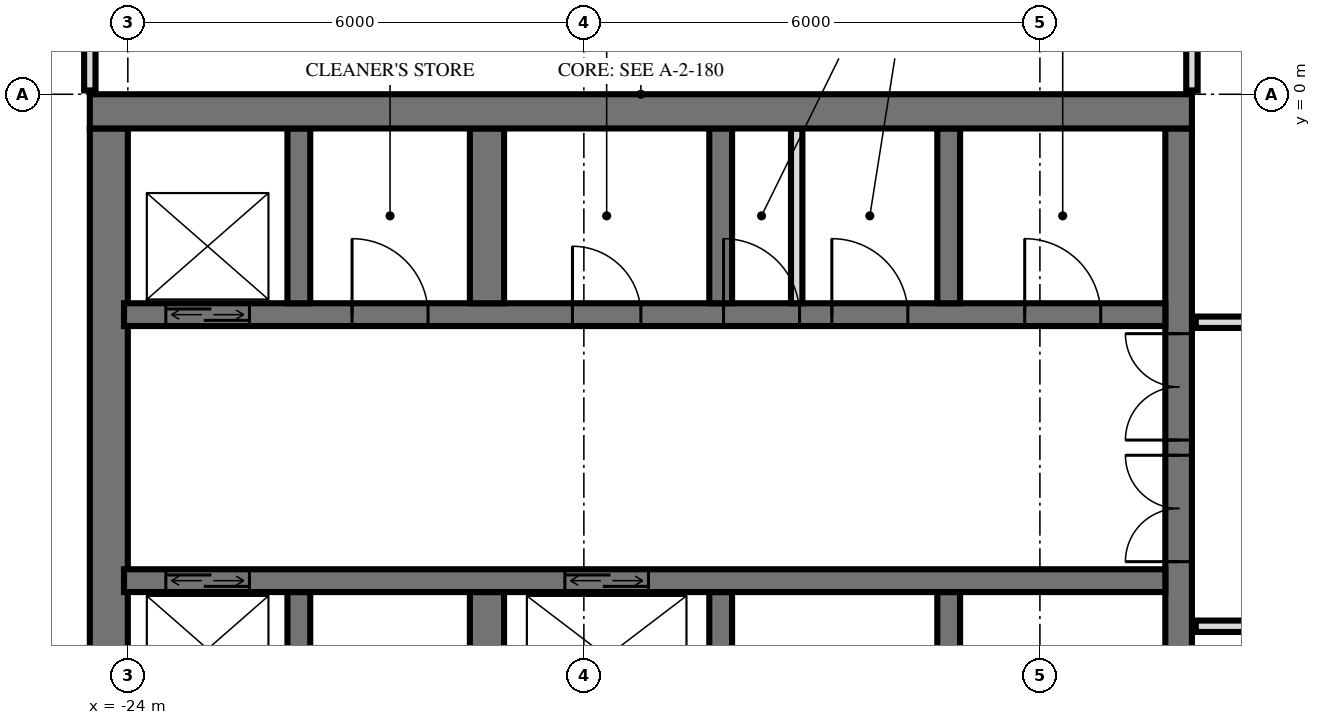
"""IFC4 building model, lengths in metres.
Left out: names, types, materials, properties, quantities, classifications, styles, units other than length and angle.
Written with IfcOpenShell. Run it as: python <this file> out.ifc"""

import sys

from ifc_helpers import new_model, si_unit, direction, frame, frame_2d, origin, place, context, subcontext, project, spatial, rectangle, extrude, element, fill, save


model = new_model("IFC4")
c1 = context("Model", 3, precision=1e-05, world=origin(), true_north=direction((0.0, 1.0)))
c2 = subcontext(c1, "Body", "Model", "MODEL_VIEW")
j1 = project(units=[si_unit("LENGTHUNIT", "METRE"), si_unit("PLANEANGLEUNIT", "RADIAN")], contexts=[c1])
p1 = place(None, origin())
s1 = spatial("IfcSite", under=j1, at=p1, CompositionType="ELEMENT")
p2 = place(p1, origin())
s2 = spatial("IfcBuilding", under=s1, at=p2, CompositionType="ELEMENT")
p3 = place(p2, frame((0.0, 0.0, 174.0)))
s3 = spatial("IfcBuildingStorey", under=s2, at=p3, CompositionType="ELEMENT", Elevation=174.0)
p4 = place(p3, frame((-24.5, -0.225, 0.0), z_axis=(0.0, 0.0, 1.0), x_axis=(1.0, 0.0, 0.0)))
e1 = element("IfcWall", 1, at=p4, inside=s3, PredefinedType="SHEAR", context=c2, shape_type="SweptSolid", body=[
    extrude(rectangle(XDim=14.5, YDim=0.45, at=frame_2d((7.25, 0.0))), origin(), (0.0, 0.0, 1.0), 3.6),
])
p5 = place(p3, frame((-10.175, -14.55, 0.0), z_axis=(0.0, 0.0, 1.0), x_axis=(0.0, 1.0, 0.0)))
e2 = element("IfcWall", 2, at=p5, inside=s3, PredefinedType="SHEAR", context=c2, shape_type="SweptSolid", body=[
    extrude(rectangle(XDim=14.1, YDim=0.35, at=frame_2d((7.05, 0.0))), origin(), (0.0, 0.0, 1.0), 3.6),
])
p6 = place(p5, frame((8.4, 0.0, 0.0)))
e3 = element("IfcOpeningElement", 3, at=p6, cuts=e2, PredefinedType="OPENING", context=c2, shape_type="SweptSolid", body=[
    extrude(rectangle(XDim=1.4, YDim=2.4, at=frame_2d((0.7, 1.2))), frame((0.0, 0.185, 0.0), z_axis=(0.0, -1.0, 0.0), x_axis=(1.0, 0.0, 0.0)), (0.0, 0.0, 1.0), 0.37),
])
p7 = place(p5, frame((10.0, 0.0, 0.0)))
e4 = element("IfcOpeningElement", 4, at=p7, cuts=e2, PredefinedType="OPENING", context=c2, shape_type="SweptSolid", body=[
    extrude(rectangle(XDim=1.4, YDim=2.4, at=frame_2d((0.7, 1.2))), frame((0.0, 0.185, 0.0), z_axis=(0.0, -1.0, 0.0), x_axis=(1.0, 0.0, 0.0)), (0.0, 0.0, 1.0), 0.37),
])
p8 = place(p5, frame((4.0, 0.0, 0.0)))
e5 = element("IfcOpeningElement", 5, at=p8, cuts=e2, PredefinedType="OPENING", context=c2, shape_type="SweptSolid", body=[
    extrude(rectangle(XDim=1.2, YDim=2.1, at=frame_2d((0.6, 1.05))), frame((0.0, 0.185, 0.0), z_axis=(0.0, -1.0, 0.0), x_axis=(1.0, 0.0, 0.0)), (0.0, 0.0, 1.0), 0.37),
])
p9 = place(p3, frame((-24.25, -14.55, 0.0), z_axis=(0.0, 0.0, 1.0), x_axis=(0.0, 1.0, 0.0)))
e6 = element("IfcWall", 6, at=p9, inside=s3, PredefinedType="SHEAR", context=c2, shape_type="SweptSolid", body=[
    extrude(rectangle(XDim=14.1, YDim=0.5, at=frame_2d((7.05, 0.0))), origin(), (0.0, 0.0, 1.0), 3.6),
])
p10 = place(p3, frame((-24.05, -2.9, 0.0), z_axis=(0.0, 0.0, 1.0), x_axis=(1.0, 0.0, 0.0)))
e7 = element("IfcWall", 7, at=p10, inside=s3, PredefinedType="SHEAR", context=c2, shape_type="SweptSolid", body=[
    extrude(rectangle(XDim=13.7, YDim=0.3, at=frame_2d((6.85, 0.0))), origin(), (0.0, 0.0, 1.0), 3.6),
])
p11 = place(p10, frame((0.55, 0.0, 0.0)))
e8 = element("IfcOpeningElement", 8, at=p11, cuts=e7, PredefinedType="OPENING", context=c2, shape_type="SweptSolid", body=[
    extrude(rectangle(XDim=1.1, YDim=2.1, at=frame_2d((0.55, 1.05))), frame((0.0, 0.16, 0.0), z_axis=(0.0, -1.0, 0.0), x_axis=(1.0, 0.0, 0.0)), (0.0, 0.0, 1.0), 0.32),
])
p12 = place(p10, frame((5.9, 0.0, 0.0)))
e9 = element("IfcOpeningElement", 9, at=p12, cuts=e7, PredefinedType="OPENING", context=c2, shape_type="SweptSolid", body=[
    extrude(rectangle(XDim=0.9, YDim=2.1, at=frame_2d((0.45, 1.05))), frame((0.0, 0.16, 0.0), z_axis=(0.0, -1.0, 0.0), x_axis=(1.0, 0.0, 0.0)), (0.0, 0.0, 1.0), 0.32),
])
p13 = place(p10, frame((11.85, 0.0, 0.0)))
e10 = element("IfcOpeningElement", 10, at=p13, cuts=e7, PredefinedType="OPENING", context=c2, shape_type="SweptSolid", body=[
    extrude(rectangle(XDim=1.0, YDim=2.1, at=frame_2d((0.5, 1.05))), frame((0.0, 0.16, 0.0), z_axis=(0.0, -1.0, 0.0), x_axis=(1.0, 0.0, 0.0)), (0.0, 0.0, 1.0), 0.32),
])
p14 = place(p10, frame((9.312, 0.0, 0.0)))
e11 = element("IfcOpeningElement", 11, at=p14, cuts=e7, PredefinedType="OPENING", context=c2, shape_type="SweptSolid", body=[
    extrude(rectangle(XDim=1.0, YDim=2.1, at=frame_2d((0.5, 1.05))), frame((0.0, 0.16, 0.0), z_axis=(0.0, -1.0, 0.0), x_axis=(1.0, 0.0, 0.0)), (0.0, 0.0, 1.0), 0.32),
])
p15 = place(p10, frame((7.887, 0.0, 0.0)))
e12 = element("IfcOpeningElement", 12, at=p15, cuts=e7, PredefinedType="OPENING", context=c2, shape_type="SweptSolid", body=[
    extrude(rectangle(XDim=1.0, YDim=2.1, at=frame_2d((0.5, 1.05))), frame((0.0, 0.16, 0.0), z_axis=(0.0, -1.0, 0.0), x_axis=(1.0, 0.0, 0.0)), (0.0, 0.0, 1.0), 0.32),
])
p16 = place(p10, frame((3.0, 0.0, 0.0)))
e13 = element("IfcOpeningElement", 13, at=p16, cuts=e7, PredefinedType="OPENING", context=c2, shape_type="SweptSolid", body=[
    extrude(rectangle(XDim=1.0, YDim=2.1, at=frame_2d((0.5, 1.05))), frame((0.0, 0.16, 0.0), z_axis=(0.0, -1.0, 0.0), x_axis=(1.0, 0.0, 0.0)), (0.0, 0.0, 1.0), 0.32),
])
p17 = place(p3, frame((-24.05, -6.4, 0.0), z_axis=(0.0, 0.0, 1.0), x_axis=(1.0, 0.0, 0.0)))
e14 = element("IfcWall", 14, at=p17, inside=s3, PredefinedType="SHEAR", context=c2, shape_type="SweptSolid", body=[
    extrude(rectangle(XDim=13.7, YDim=0.3, at=frame_2d((6.85, 0.0))), origin(), (0.0, 0.0, 1.0), 3.6),
])
p18 = place(p17, frame((0.55, 0.0, 0.0)))
e15 = element("IfcOpeningElement", 15, at=p18, cuts=e14, PredefinedType="OPENING", context=c2, shape_type="SweptSolid", body=[
    extrude(rectangle(XDim=1.1, YDim=2.1, at=frame_2d((0.55, 1.05))), frame((0.0, 0.16, 0.0), z_axis=(0.0, -1.0, 0.0), x_axis=(1.0, 0.0, 0.0)), (0.0, 0.0, 1.0), 0.32),
])
p19 = place(p17, frame((5.8, 0.0, 0.0)))
e16 = element("IfcOpeningElement", 16, at=p19, cuts=e14, PredefinedType="OPENING", context=c2, shape_type="SweptSolid", body=[
    extrude(rectangle(XDim=1.1, YDim=2.1, at=frame_2d((0.55, 1.05))), frame((0.0, 0.16, 0.0), z_axis=(0.0, -1.0, 0.0), x_axis=(1.0, 0.0, 0.0)), (0.0, 0.0, 1.0), 0.32),
])
for number, where, z_axis, x_axis in (
    (17, (-13.2, -2.75, 0.0), (0.0, 0.0, 1.0), (0.0, 1.0, 0.0)),
    (18, (-13.2, -8.85, 0.0), (0.0, 0.0, 1.0), (0.0, 1.0, 0.0)),
    (19, (-16.2, -2.75, 0.0), (0.0, 0.0, 1.0), (0.0, 1.0, 0.0)),
    (20, (-16.2, -8.85, 0.0), (0.0, 0.0, 1.0), (0.0, 1.0, 0.0)),
):
    element("IfcWall", number, at=place(p3, frame(where, z_axis=z_axis, x_axis=x_axis)), inside=s3, PredefinedType="SHEAR", context=c2, shape_type="SweptSolid", body=[
        extrude(rectangle(XDim=2.3, YDim=0.3, at=frame_2d((1.15, 0.0))), origin(), (0.0, 0.0, 1.0), 3.6),
    ])
for number, where, z_axis, x_axis in (
    (21, (-19.275, -2.75, 0.0), (0.0, 0.0, 1.0), (0.0, 1.0, 0.0)),
    (22, (-19.275, -8.85, 0.0), (0.0, 0.0, 1.0), (0.0, 1.0, 0.0)),
):
    element("IfcWall", number, at=place(p3, frame(where, z_axis=z_axis, x_axis=x_axis)), inside=s3, PredefinedType="SHEAR", context=c2, shape_type="SweptSolid", body=[
        extrude(rectangle(XDim=2.3, YDim=0.45, at=frame_2d((1.15, 0.0))), origin(), (0.0, 0.0, 1.0), 3.6),
    ])
for number, where, z_axis, x_axis in (
    (23, (-21.75, -2.75, 0.0), (0.0, 0.0, 1.0), (0.0, 1.0, 0.0)),
    (24, (-21.75, -8.85, 0.0), (0.0, 0.0, 1.0), (0.0, 1.0, 0.0)),
):
    element("IfcWall", number, at=place(p3, frame(where, z_axis=z_axis, x_axis=x_axis)), inside=s3, PredefinedType="SHEAR", context=c2, shape_type="SweptSolid", body=[
        extrude(rectangle(XDim=2.3, YDim=0.3, at=frame_2d((1.15, 0.0))), origin(), (0.0, 0.0, 1.0), 3.6),
    ])
p20 = place(p3, frame((-15.2, -2.75, 0.0), z_axis=(0.0, 0.0, 1.0), x_axis=(0.0, 1.0, 0.0)))
e25 = element("IfcWall", 25, at=p20, inside=s3, PredefinedType="PARTITIONING", context=c2, shape_type="SweptSolid", body=[
    extrude(rectangle(XDim=2.3, YDim=0.15, at=frame_2d((1.15, 0.0))), origin(), (0.0, 0.0, 1.0), 3.3),
])
p21 = place(p3, frame((-10.0, 0.05, 0.0), z_axis=(0.0, 0.0, 1.0), x_axis=(0.0, 1.0, 0.0)))
e26 = element("IfcWall", 26, at=p21, inside=s3, PredefinedType="PARTITIONING", context=c2, shape_type="SweptSolid", body=[
    extrude(rectangle(XDim=0.97, YDim=0.15, at=frame_2d((0.485, 0.0))), origin(), (0.0, 0.0, 1.0), 3.32),
])
p22 = place(p3, frame((-24.5, 0.05, 0.0), z_axis=(0.0, 0.0, 1.0), x_axis=(0.0, 1.0, 0.0)))
e27 = element("IfcWall", 27, at=p22, inside=s3, PredefinedType="PARTITIONING", context=c2, shape_type="SweptSolid", body=[
    extrude(rectangle(XDim=0.807, YDim=0.15, at=frame_2d((0.404, 0.0))), origin(), (0.0, 0.0, 1.0), 3.32),
])
p23 = place(p3, frame((-9.95, -7.0, 0.0), z_axis=(0.0, 0.0, 1.0), x_axis=(1.0, 0.0, 0.0)))
e28 = element("IfcWall", 28, at=p23, inside=s3, PredefinedType="PARTITIONING", context=c2, shape_type="SweptSolid", body=[
    extrude(rectangle(XDim=19.9, YDim=0.15, at=frame_2d((9.95, 0.0))), origin(), (0.0, 0.0, 1.0), 3.32),
])
p24 = place(p23, frame((9.45, 0.0, 0.0)))
e29 = element("IfcOpeningElement", 29, at=p24, cuts=e28, PredefinedType="OPENING", context=c2, shape_type="SweptSolid", body=[
    extrude(rectangle(XDim=1.0, YDim=2.1, at=frame_2d((0.5, 1.05))), frame((0.0, 0.085, 0.0), z_axis=(0.0, -1.0, 0.0), x_axis=(1.0, 0.0, 0.0)), (0.0, 0.0, 1.0), 0.17),
])
p25 = place(p23, frame((15.45, 0.0, 0.0)))
e30 = element("IfcOpeningElement", 30, at=p25, cuts=e28, PredefinedType="OPENING", context=c2, shape_type="SweptSolid", body=[
    extrude(rectangle(XDim=1.0, YDim=2.1, at=frame_2d((0.5, 1.05))), frame((0.0, 0.085, 0.0), z_axis=(0.0, -1.0, 0.0), x_axis=(1.0, 0.0, 0.0)), (0.0, 0.0, 1.0), 0.17),
])
p26 = place(p3, frame((-9.95, -3.0, 0.0), z_axis=(0.0, 0.0, 1.0), x_axis=(1.0, 0.0, 0.0)))
e31 = element("IfcWall", 31, at=p26, inside=s3, PredefinedType="PARTITIONING", context=c2, shape_type="SweptSolid", body=[
    extrude(rectangle(XDim=19.9, YDim=0.15, at=frame_2d((9.95, 0.0))), origin(), (0.0, 0.0, 1.0), 3.32),
])
p27 = place(p26, frame((2.2, 0.0, 0.0)))
e32 = element("IfcOpeningElement", 32, at=p27, cuts=e31, PredefinedType="OPENING", context=c2, shape_type="SweptSolid", body=[
    extrude(rectangle(XDim=1.0, YDim=2.1, at=frame_2d((0.5, 1.05))), frame((0.0, 0.085, 0.0), z_axis=(0.0, -1.0, 0.0), x_axis=(1.0, 0.0, 0.0)), (0.0, 0.0, 1.0), 0.17),
])
p28 = place(p26, frame((7.2, 0.0, 0.0)))
e33 = element("IfcOpeningElement", 33, at=p28, cuts=e31, PredefinedType="OPENING", context=c2, shape_type="SweptSolid", body=[
    extrude(rectangle(XDim=1.0, YDim=2.1, at=frame_2d((0.5, 1.05))), frame((0.0, 0.085, 0.0), z_axis=(0.0, -1.0, 0.0), x_axis=(1.0, 0.0, 0.0)), (0.0, 0.0, 1.0), 0.17),
])
p29 = place(p26, frame((11.7, 0.0, 0.0)))
e34 = element("IfcOpeningElement", 34, at=p29, cuts=e31, PredefinedType="OPENING", context=c2, shape_type="SweptSolid", body=[
    extrude(rectangle(XDim=1.0, YDim=2.1, at=frame_2d((0.5, 1.05))), frame((0.0, 0.085, 0.0), z_axis=(0.0, -1.0, 0.0), x_axis=(1.0, 0.0, 0.0)), (0.0, 0.0, 1.0), 0.17),
])
p30 = place(p26, frame((15.45, 0.0, 0.0)))
e35 = element("IfcOpeningElement", 35, at=p30, cuts=e31, PredefinedType="OPENING", context=c2, shape_type="SweptSolid", body=[
    extrude(rectangle(XDim=1.0, YDim=2.1, at=frame_2d((0.5, 1.05))), frame((0.0, 0.085, 0.0), z_axis=(0.0, -1.0, 0.0), x_axis=(1.0, 0.0, 0.0)), (0.0, 0.0, 1.0), 0.17),
])
p31 = place(p26, frame((18.2, 0.0, 0.0)))
e36 = element("IfcOpeningElement", 36, at=p31, cuts=e31, PredefinedType="OPENING", context=c2, shape_type="SweptSolid", body=[
    extrude(rectangle(XDim=1.0, YDim=2.1, at=frame_2d((0.5, 1.05))), frame((0.0, 0.085, 0.0), z_axis=(0.0, -1.0, 0.0), x_axis=(1.0, 0.0, 0.0)), (0.0, 0.0, 1.0), 0.17),
])
p32 = place(p11, origin())
e37 = element("IfcDoor", 37, at=p32, inside=s3, OperationType="DOUBLE_DOOR_SLIDING", PredefinedType="USERDEFINED", context=c2, shape_type="SweptSolid", body=[
    extrude(rectangle(XDim=1.1, YDim=2.1, at=frame_2d((0.55, 1.05))), frame((0.0, 0.025, 0.0), z_axis=(0.0, -1.0, 0.0), x_axis=(1.0, 0.0, 0.0)), (0.0, 0.0, 1.0), 0.05),
])
fill(e8, e37)
p33 = place(p18, origin())
e38 = element("IfcDoor", 38, at=p33, inside=s3, OperationType="DOUBLE_DOOR_SLIDING", PredefinedType="USERDEFINED", context=c2, shape_type="SweptSolid", body=[
    extrude(rectangle(XDim=1.1, YDim=2.1, at=frame_2d((0.55, 1.05))), frame((0.0, 0.025, 0.0), z_axis=(0.0, -1.0, 0.0), x_axis=(1.0, 0.0, 0.0)), (0.0, 0.0, 1.0), 0.05),
])
fill(e15, e38)
p34 = place(p19, origin())
e39 = element("IfcDoor", 39, at=p34, inside=s3, OperationType="DOUBLE_DOOR_SLIDING", PredefinedType="USERDEFINED", context=c2, shape_type="SweptSolid", body=[
    extrude(rectangle(XDim=1.1, YDim=2.1, at=frame_2d((0.55, 1.05))), frame((0.0, 0.025, 0.0), z_axis=(0.0, -1.0, 0.0), x_axis=(1.0, 0.0, 0.0)), (0.0, 0.0, 1.0), 0.05),
])
fill(e16, e39)
p35 = place(p6, origin())
e40 = element("IfcDoor", 40, at=p35, inside=s3, OperationType="DOUBLE_DOOR_SINGLE_SWING", PredefinedType="DOOR", context=c2, shape_type="SweptSolid", body=[
    extrude(rectangle(XDim=1.4, YDim=2.4, at=frame_2d((0.7, 1.2))), frame((0.0, 0.025, 0.0), z_axis=(0.0, -1.0, 0.0), x_axis=(1.0, 0.0, 0.0)), (0.0, 0.0, 1.0), 0.05),
])
fill(e3, e40)
p36 = place(p7, origin())
e41 = element("IfcDoor", 41, at=p36, inside=s3, OperationType="DOUBLE_DOOR_SINGLE_SWING", PredefinedType="DOOR", context=c2, shape_type="SweptSolid", body=[
    extrude(rectangle(XDim=1.4, YDim=2.4, at=frame_2d((0.7, 1.2))), frame((0.0, 0.025, 0.0), z_axis=(0.0, -1.0, 0.0), x_axis=(1.0, 0.0, 0.0)), (0.0, 0.0, 1.0), 0.05),
])
fill(e4, e41)
p37 = place(p12, origin())
e42 = element("IfcDoor", 42, at=p37, inside=s3, OperationType="SINGLE_SWING_RIGHT", PredefinedType="DOOR", context=c2, shape_type="SweptSolid", body=[
    extrude(rectangle(XDim=0.9, YDim=2.1, at=frame_2d((0.45, 1.05))), frame((0.0, 0.025, 0.0), z_axis=(0.0, -1.0, 0.0), x_axis=(1.0, 0.0, 0.0)), (0.0, 0.0, 1.0), 0.05),
])
fill(e9, e42)
p38 = place(p13, origin())
e43 = element("IfcDoor", 43, at=p38, inside=s3, OperationType="SINGLE_SWING_RIGHT", PredefinedType="DOOR", context=c2, shape_type="SweptSolid", body=[
    extrude(rectangle(XDim=1.0, YDim=2.1, at=frame_2d((0.5, 1.05))), frame((0.0, 0.025, 0.0), z_axis=(0.0, -1.0, 0.0), x_axis=(1.0, 0.0, 0.0)), (0.0, 0.0, 1.0), 0.05),
])
fill(e10, e43)
p39 = place(p14, origin())
e44 = element("IfcDoor", 44, at=p39, inside=s3, OperationType="SINGLE_SWING_RIGHT", PredefinedType="DOOR", context=c2, shape_type="SweptSolid", body=[
    extrude(rectangle(XDim=1.0, YDim=2.1, at=frame_2d((0.5, 1.05))), frame((0.0, 0.025, 0.0), z_axis=(0.0, -1.0, 0.0), x_axis=(1.0, 0.0, 0.0)), (0.0, 0.0, 1.0), 0.05),
])
fill(e11, e44)
p40 = place(p15, origin())
e45 = element("IfcDoor", 45, at=p40, inside=s3, OperationType="SINGLE_SWING_RIGHT", PredefinedType="DOOR", context=c2, shape_type="SweptSolid", body=[
    extrude(rectangle(XDim=1.0, YDim=2.1, at=frame_2d((0.5, 1.05))), frame((0.0, 0.025, 0.0), z_axis=(0.0, -1.0, 0.0), x_axis=(1.0, 0.0, 0.0)), (0.0, 0.0, 1.0), 0.05),
])
fill(e12, e45)
p41 = place(p16, origin())
e46 = element("IfcDoor", 46, at=p41, inside=s3, OperationType="SINGLE_SWING_RIGHT", PredefinedType="DOOR", context=c2, shape_type="SweptSolid", body=[
    extrude(rectangle(XDim=1.0, YDim=2.1, at=frame_2d((0.5, 1.05))), frame((0.0, 0.025, 0.0), z_axis=(0.0, -1.0, 0.0), x_axis=(1.0, 0.0, 0.0)), (0.0, 0.0, 1.0), 0.05),
])
fill(e13, e46)
save(model, sys.argv[1])
